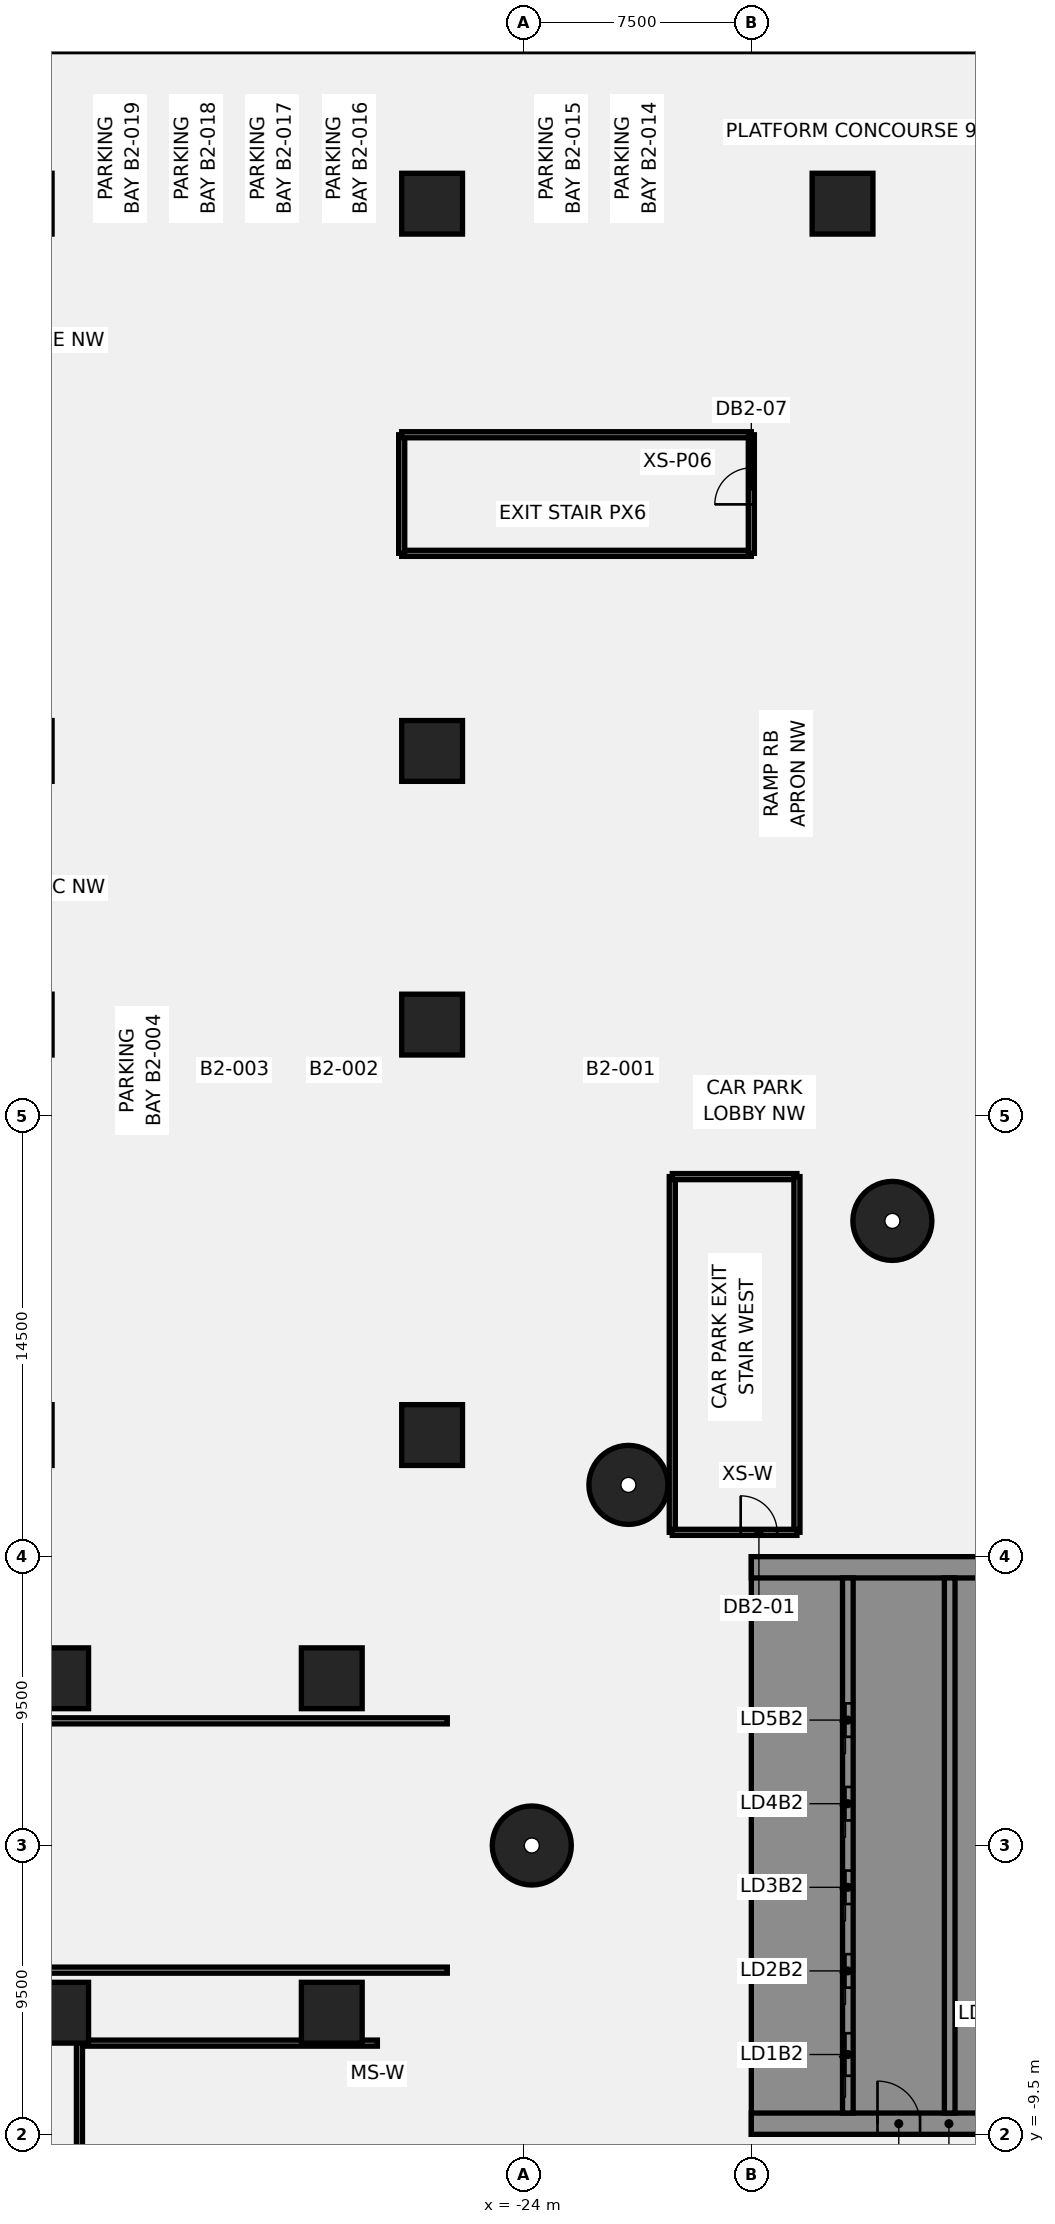
"""IFC4 building model, lengths in metres.
Left out: names, types, materials, properties, quantities, classifications, styles, units other than length and angle.
Written with IfcOpenShell. Run it as: python <this file> out.ifc"""

import sys

from ifc_helpers import new_model, si_unit, direction, frame, frame_2d, origin, origin_2d, place, context, subcontext, project, spatial, polyline, rectangle, circle, outline, extrude, element, fill, save


model = new_model("IFC4")
c1 = context("Model", 3, precision=1e-05, world=origin(), true_north=direction((0.0, 1.0)))
c2 = subcontext(c1, "Body", "Model", "MODEL_VIEW")
j1 = project(units=[si_unit("LENGTHUNIT", "METRE"), si_unit("PLANEANGLEUNIT", "RADIAN")], contexts=[c1])
p1 = place(None, origin())
s1 = spatial("IfcSite", under=j1, at=p1, CompositionType="ELEMENT")
p2 = place(p1, origin())
s2 = spatial("IfcBuilding", under=s1, at=p2, CompositionType="ELEMENT")
p3 = place(p2, frame((0.0, 0.0, -14.0)))
s3 = spatial("IfcBuildingStorey", under=s2, at=p3, CompositionType="ELEMENT", Elevation=-14.0)
for number, where, z_axis, x_axis in (
    (1, (-11.86, 20.543, -0.45), (0.0, 0.0, 1.0), (1.0, 0.0, 0.0)),
    (2, (-20.543, 11.86, -0.45), (0.0, 0.0, 1.0), (1.0, 0.0, 0.0)),
    (3, (-23.721, 0.0, -0.45), (0.0, 0.0, 1.0), (1.0, 0.0, 0.0)),
):
    element("IfcColumn", number, at=place(p3, frame(where, z_axis=z_axis, x_axis=x_axis)), inside=s3, PredefinedType="COLUMN", context=c2, shape_type="SweptSolid", body=[
        extrude(circle(Radius=1.3, at=origin_2d()), origin(), (0.0, 0.0, 1.0), 7.0),
    ])
for number, where, z_axis, x_axis in (
    (4, (-39.3, -5.5, -0.45), (0.0, 0.0, 1.0), (1.0, 0.0, 0.0)),
    (5, (-39.3, 5.5, -0.45), (0.0, 0.0, 1.0), (1.0, 0.0, 0.0)),
    (6, (-30.3, -5.5, -0.45), (0.0, 0.0, 1.0), (1.0, 0.0, 0.0)),
    (7, (-30.3, 5.5, -0.45), (0.0, 0.0, 1.0), (1.0, 0.0, 0.0)),
    (8, (-27.0, 13.5, -0.45), (0.0, 0.0, 1.0), (1.0, 0.0, 0.0)),
    (9, (-27.0, 27.0, -0.45), (0.0, 0.0, 1.0), (1.0, 0.0, 0.0)),
    (10, (-27.0, 36.0, -0.45), (0.0, 0.0, 1.0), (1.0, 0.0, 0.0)),
    (11, (-27.0, 54.0, -0.45), (0.0, 0.0, 1.0), (1.0, 0.0, 0.0)),
    (12, (-13.5, 54.0, -0.45), (0.0, 0.0, 1.0), (1.0, 0.0, 0.0)),
):
    element("IfcColumn", number, at=place(p3, frame(where, z_axis=z_axis, x_axis=x_axis)), inside=s3, PredefinedType="COLUMN", context=c2, shape_type="SweptSolid", body=[
        extrude(rectangle(XDim=2.0, YDim=2.0, at=origin_2d()), origin(), (0.0, 0.0, 1.0), 7.0),
    ])
p4 = place(p3, frame((-19.1, 10.3, 0.0), z_axis=(0.0, 0.0, 1.0), x_axis=(0.0, 1.0, 0.0)))
e13 = element("IfcWall", 13, at=p4, inside=s3, PredefinedType="PARTITIONING", context=c2, shape_type="SweptSolid", body=[
    extrude(rectangle(XDim=11.7, YDim=0.2, at=frame_2d((5.85, 0.0))), origin(), (0.0, 0.0, 1.0), 6.55),
])
p5 = place(p3, frame((-19.1, 22.0, 0.0), z_axis=(0.0, 0.0, 1.0), x_axis=(1.0, 0.0, 0.0)))
e14 = element("IfcWall", 14, at=p5, inside=s3, PredefinedType="PARTITIONING", context=c2, shape_type="SweptSolid", body=[
    extrude(rectangle(XDim=4.1, YDim=0.2, at=frame_2d((2.05, 0.0))), origin(), (0.0, 0.0, 1.0), 6.55),
])
p6 = place(p3, frame((-15.0, 10.3, 0.0), z_axis=(0.0, 0.0, 1.0), x_axis=(0.0, 1.0, 0.0)))
e15 = element("IfcWall", 15, at=p6, inside=s3, PredefinedType="PARTITIONING", context=c2, shape_type="SweptSolid", body=[
    extrude(rectangle(XDim=11.7, YDim=0.2, at=frame_2d((5.85, 0.0))), origin(), (0.0, 0.0, 1.0), 6.55),
])
p7 = place(p3, frame((-19.1, 10.3, 0.0), z_axis=(0.0, 0.0, 1.0), x_axis=(1.0, 0.0, 0.0)))
e16 = element("IfcWall", 16, at=p7, inside=s3, PredefinedType="PARTITIONING", context=c2, shape_type="SweptSolid", body=[
    extrude(rectangle(XDim=4.1, YDim=0.2, at=frame_2d((2.05, 0.0))), origin(), (0.0, 0.0, 1.0), 6.55),
])
p8 = place(p7, frame((2.25, 0.0, 0.0)))
e17 = element("IfcOpeningElement", 17, at=p8, cuts=e16, PredefinedType="OPENING", context=c2, shape_type="SweptSolid", body=[
    extrude(rectangle(XDim=1.2, YDim=2.1, at=frame_2d((0.6, 1.05))), frame((0.0, 0.11, 0.0), z_axis=(0.0, -1.0, 0.0), x_axis=(1.0, 0.0, 0.0)), (0.0, 0.0, 1.0), 0.22),
])
p9 = place(p3, frame((-28.0, 42.5, 0.0), z_axis=(0.0, 0.0, 1.0), x_axis=(1.0, 0.0, 0.0)))
e18 = element("IfcWall", 18, at=p9, inside=s3, PredefinedType="PARTITIONING", context=c2, shape_type="SweptSolid", body=[
    extrude(rectangle(XDim=11.5, YDim=0.2, at=frame_2d((5.75, 0.0))), origin(), (0.0, 0.0, 1.0), 6.55),
])
p10 = place(p3, frame((-28.0, 42.5, 0.0), z_axis=(0.0, 0.0, 1.0), x_axis=(0.0, 1.0, 0.0)))
e19 = element("IfcWall", 19, at=p10, inside=s3, PredefinedType="PARTITIONING", context=c2, shape_type="SweptSolid", body=[
    extrude(rectangle(XDim=3.9, YDim=0.2, at=frame_2d((1.95, 0.0))), origin(), (0.0, 0.0, 1.0), 6.55),
])
p11 = place(p3, frame((-28.0, 46.4, 0.0), z_axis=(0.0, 0.0, 1.0), x_axis=(1.0, 0.0, 0.0)))
e20 = element("IfcWall", 20, at=p11, inside=s3, PredefinedType="PARTITIONING", context=c2, shape_type="SweptSolid", body=[
    extrude(rectangle(XDim=11.5, YDim=0.2, at=frame_2d((5.75, 0.0))), origin(), (0.0, 0.0, 1.0), 6.55),
])
p12 = place(p3, frame((-16.5, 42.5, 0.0), z_axis=(0.0, 0.0, 1.0), x_axis=(0.0, 1.0, 0.0)))
e21 = element("IfcWall", 21, at=p12, inside=s3, PredefinedType="PARTITIONING", context=c2, shape_type="SweptSolid", body=[
    extrude(rectangle(XDim=3.9, YDim=0.2, at=frame_2d((1.95, 0.0))), origin(), (0.0, 0.0, 1.0), 6.55),
])
p13 = place(p12, frame((1.61, 0.0, 0.0)))
e22 = element("IfcOpeningElement", 22, at=p13, cuts=e21, PredefinedType="OPENING", context=c2, shape_type="SweptSolid", body=[
    extrude(rectangle(XDim=1.2, YDim=2.1, at=frame_2d((0.6, 1.05))), frame((0.0, 0.11, 0.0), z_axis=(0.0, -1.0, 0.0), x_axis=(1.0, 0.0, 0.0)), (0.0, 0.0, 1.0), 0.22),
])
for number, where, z_axis, x_axis in (
    (23, (-69.4, 4.1, 0.0), (0.0, 0.0, 1.0), (1.0, 0.0, 0.0)),
    (24, (-69.4, -4.1, 0.0), (0.0, 0.0, 1.0), (1.0, 0.0, 0.0)),
):
    element("IfcWall", number, at=place(p3, frame(where, z_axis=z_axis, x_axis=x_axis)), inside=s3, PredefinedType="PARTITIONING", context=c2, shape_type="SweptSolid", body=[
        extrude(rectangle(XDim=42.9, YDim=0.2, at=frame_2d((21.45, 0.0))), origin(), (0.0, 0.0, 1.0), 6.55),
    ])
p14 = place(p3, frame((-28.8, -6.5, 0.0), z_axis=(0.0, 0.0, 1.0), x_axis=(-1.0, 0.0, 0.0)))
e25 = element("IfcWall", 25, at=p14, inside=s3, PredefinedType="SOLIDWALL", context=c2, shape_type="SweptSolid", body=[
    extrude(rectangle(XDim=9.7, YDim=0.2, at=frame_2d((4.85, 0.0))), origin(), (0.0, 0.0, 1.0), 6.55),
])
p15 = place(p3, frame((-38.6, -6.4, 0.0), z_axis=(0.0, 0.0, 1.0), x_axis=(0.0, -1.0, 0.0)))
e26 = element("IfcWall", 26, at=p15, inside=s3, PredefinedType="SOLIDWALL", context=c2, shape_type="SweptSolid", body=[
    extrude(rectangle(XDim=4.3, YDim=0.2, at=frame_2d((2.15, 0.0))), origin(), (0.0, 0.0, 1.0), 6.55),
])
p16 = place(p3, frame((-16.5, -9.15, 0.0), z_axis=(0.0, 0.0, 1.0), x_axis=(1.0, 0.0, 0.0)))
e27 = element("IfcWall", 27, at=p16, inside=s3, PredefinedType="SHEAR", context=c2, shape_type="SweptSolid", body=[
    extrude(rectangle(XDim=13.0, YDim=0.7, at=frame_2d((6.5, 0.0))), origin(), (0.0, 0.0, 1.0), 6.55),
])
p17 = place(p16, frame((4.15, 0.0, 0.0)))
e28 = element("IfcOpeningElement", 28, at=p17, cuts=e27, PredefinedType="OPENING", context=c2, shape_type="SweptSolid", body=[
    extrude(rectangle(XDim=1.4, YDim=2.1, at=frame_2d((0.7, 1.05))), frame((0.0, 0.36, 0.0), z_axis=(0.0, -1.0, 0.0), x_axis=(1.0, 0.0, 0.0)), (0.0, 0.0, 1.0), 0.72),
])
p18 = place(p16, frame((10.125, 0.0, 0.0)))
e29 = element("IfcOpeningElement", 29, at=p18, cuts=e27, PredefinedType="OPENING", context=c2, shape_type="SweptSolid", body=[
    extrude(rectangle(XDim=1.4, YDim=2.1, at=frame_2d((0.7, 1.05))), frame((0.0, 0.36, 0.0), z_axis=(0.0, -1.0, 0.0), x_axis=(1.0, 0.0, 0.0)), (0.0, 0.0, 1.0), 0.72),
])
p19 = place(p3, origin())
e30 = element("IfcWall", 30, at=p19, inside=s3, PredefinedType="SHEAR", context=c2, shape_type="SweptSolid", body=[
    extrude(outline(polyline([(-13.5, -8.8), (-13.5, -8.125), (-15.8, -8.125), (-15.8, -5.625), (-13.5, -5.625), (-13.5, -5.375), (-15.8, -5.375), (-15.8, -2.875), (-13.5, -2.875), (-13.5, -2.625), (-15.8, -2.625), (-15.8, -0.125), (-13.5, -0.125), (-13.5, 0.125), (-15.8, 0.125), (-15.8, 2.625), (-13.5, 2.625), (-13.5, 2.875), (-15.8, 2.875), (-15.8, 5.375), (-13.5, 5.375), (-13.5, 5.625), (-15.8, 5.625), (-15.8, 8.125), (-13.5, 8.125), (-13.5, 8.8), (-15.8, 8.8), (-16.5, 8.8), (-16.5, -8.8), (-15.8, -8.8), (-13.5, -8.8)])), origin(), (0.0, 0.0, 1.0), 6.55),
])
p20 = place(p3, frame((-16.5, 9.15, 0.0), z_axis=(0.0, 0.0, 1.0), x_axis=(1.0, 0.0, 0.0)))
e31 = element("IfcWall", 31, at=p20, inside=s3, PredefinedType="SHEAR", context=c2, shape_type="SweptSolid", body=[
    extrude(rectangle(XDim=13.0, YDim=0.7, at=frame_2d((6.5, 0.0))), origin(), (0.0, 0.0, 1.0), 6.55),
])
p21 = place(p3, origin())
e32 = element("IfcWall", 32, at=p21, inside=s3, PredefinedType="SHEAR", context=c2, shape_type="SweptSolid", body=[
    extrude(outline(polyline([(-9.8, -5.375), (-9.8, -5.625), (-7.5, -5.625), (-7.15, -5.625), (-7.15, 8.8), (-7.5, 8.8), (-9.8, 8.8), (-9.8, 8.125), (-7.5, 8.125), (-7.5, 5.625), (-9.8, 5.625), (-9.8, 5.375), (-7.5, 5.375), (-7.5, 2.875), (-9.8, 2.875), (-9.8, 2.625), (-7.5, 2.625), (-7.5, 0.125), (-9.8, 0.125), (-9.8, -0.125), (-7.5, -0.125), (-7.5, -2.625), (-9.8, -2.625), (-9.8, -2.875), (-7.5, -2.875), (-7.5, -5.375), (-9.8, -5.375)])), origin(), (0.0, 0.0, 1.0), 6.55),
])
p22 = place(p3, origin())
e33 = element("IfcWall", 33, at=p22, inside=s3, PredefinedType="SHEAR", context=c2, shape_type="SweptSolid", body=[
    extrude(outline(polyline([(-7.5, -8.125), (-9.55, -8.125), (-9.55, -5.625), (-9.8, -5.625), (-9.8, -8.125), (-9.8, -8.8), (-7.5, -8.8), (-7.5, -8.125)])), origin(), (0.0, 0.0, 1.0), 6.55),
])
p23 = place(p3, frame((-13.325, -8.8, 0.0), z_axis=(0.0, 0.0, 1.0), x_axis=(0.0, 1.0, 0.0)))
e34 = element("IfcWall", 34, at=p23, inside=s3, PredefinedType="SHEAR", context=c2, shape_type="SweptSolid", body=[
    extrude(rectangle(XDim=17.6, YDim=0.35, at=frame_2d((8.8, 0.0))), origin(), (0.0, 0.0, 1.0), 6.55),
])
p24 = place(p23, frame((1.225, 0.0, 0.0)))
e35 = element("IfcOpeningElement", 35, at=p24, cuts=e34, PredefinedType="OPENING", context=c2, shape_type="SweptSolid", body=[
    extrude(rectangle(XDim=1.4, YDim=2.1, at=frame_2d((0.7, 1.05))), frame((0.0, 0.185, 0.0), z_axis=(0.0, -1.0, 0.0), x_axis=(1.0, 0.0, 0.0)), (0.0, 0.0, 1.0), 0.37),
])
p25 = place(p23, frame((4.125, 0.0, 0.0)))
e36 = element("IfcOpeningElement", 36, at=p25, cuts=e34, PredefinedType="OPENING", context=c2, shape_type="SweptSolid", body=[
    extrude(rectangle(XDim=1.1, YDim=2.1, at=frame_2d((0.55, 1.05))), frame((0.0, 0.185, 0.0), z_axis=(0.0, -1.0, 0.0), x_axis=(1.0, 0.0, 0.0)), (0.0, 0.0, 1.0), 0.37),
])
p26 = place(p23, frame((6.875, 0.0, 0.0)))
e37 = element("IfcOpeningElement", 37, at=p26, cuts=e34, PredefinedType="OPENING", context=c2, shape_type="SweptSolid", body=[
    extrude(rectangle(XDim=1.1, YDim=2.1, at=frame_2d((0.55, 1.05))), frame((0.0, 0.185, 0.0), z_axis=(0.0, -1.0, 0.0), x_axis=(1.0, 0.0, 0.0)), (0.0, 0.0, 1.0), 0.37),
])
p27 = place(p23, frame((9.625, 0.0, 0.0)))
e38 = element("IfcOpeningElement", 38, at=p27, cuts=e34, PredefinedType="OPENING", context=c2, shape_type="SweptSolid", body=[
    extrude(rectangle(XDim=1.1, YDim=2.1, at=frame_2d((0.55, 1.05))), frame((0.0, 0.185, 0.0), z_axis=(0.0, -1.0, 0.0), x_axis=(1.0, 0.0, 0.0)), (0.0, 0.0, 1.0), 0.37),
])
p28 = place(p23, frame((12.375, 0.0, 0.0)))
e39 = element("IfcOpeningElement", 39, at=p28, cuts=e34, PredefinedType="OPENING", context=c2, shape_type="SweptSolid", body=[
    extrude(rectangle(XDim=1.1, YDim=2.1, at=frame_2d((0.55, 1.05))), frame((0.0, 0.185, 0.0), z_axis=(0.0, -1.0, 0.0), x_axis=(1.0, 0.0, 0.0)), (0.0, 0.0, 1.0), 0.37),
])
p29 = place(p3, frame((-9.975, -8.8, 0.0), z_axis=(0.0, 0.0, 1.0), x_axis=(0.0, 1.0, 0.0)))
e40 = element("IfcWall", 40, at=p29, inside=s3, PredefinedType="SHEAR", context=c2, shape_type="SweptSolid", body=[
    extrude(rectangle(XDim=17.6, YDim=0.35, at=frame_2d((8.8, 0.0))), origin(), (0.0, 0.0, 1.0), 6.55),
])
p30 = place(p8, origin())
e41 = element("IfcDoor", 41, at=p30, inside=s3, OperationType="SINGLE_SWING_LEFT", PredefinedType="DOOR", context=c2, shape_type="SweptSolid", body=[
    extrude(rectangle(XDim=1.2, YDim=2.1, at=frame_2d((0.6, 1.05))), frame((0.0, 0.025, 0.0), z_axis=(0.0, -1.0, 0.0), x_axis=(1.0, 0.0, 0.0)), (0.0, 0.0, 1.0), 0.05),
])
fill(e17, e41)
p31 = place(p13, origin())
e42 = element("IfcDoor", 42, at=p31, inside=s3, OperationType="SINGLE_SWING_LEFT", PredefinedType="DOOR", context=c2, shape_type="SweptSolid", body=[
    extrude(rectangle(XDim=1.2, YDim=2.1, at=frame_2d((0.6, 1.05))), frame((0.0, 0.025, 0.0), z_axis=(0.0, -1.0, 0.0), x_axis=(1.0, 0.0, 0.0)), (0.0, 0.0, 1.0), 0.05),
])
fill(e22, e42)
p32 = place(p17, origin())
e43 = element("IfcDoor", 43, at=p32, inside=s3, OperationType="SINGLE_SWING_LEFT", PredefinedType="DOOR", context=c2, shape_type="SweptSolid", body=[
    extrude(rectangle(XDim=1.4, YDim=2.1, at=frame_2d((0.7, 1.05))), frame((0.0, 0.025, 0.0), z_axis=(0.0, -1.0, 0.0), x_axis=(1.0, 0.0, 0.0)), (0.0, 0.0, 1.0), 0.05),
])
fill(e28, e43)
p33 = place(p24, origin())
e44 = element("IfcDoor", 44, at=p33, inside=s3, OperationType="SLIDING_TO_LEFT", PredefinedType="DOOR", context=c2, shape_type="SweptSolid", body=[
    extrude(rectangle(XDim=1.4, YDim=2.1, at=frame_2d((0.7, 1.05))), frame((0.0, 0.025, 0.0), z_axis=(0.0, -1.0, 0.0), x_axis=(1.0, 0.0, 0.0)), (0.0, 0.0, 1.0), 0.05),
])
fill(e35, e44)
p34 = place(p25, origin())
e45 = element("IfcDoor", 45, at=p34, inside=s3, OperationType="SLIDING_TO_LEFT", PredefinedType="DOOR", context=c2, shape_type="SweptSolid", body=[
    extrude(rectangle(XDim=1.1, YDim=2.1, at=frame_2d((0.55, 1.05))), frame((0.0, 0.025, 0.0), z_axis=(0.0, -1.0, 0.0), x_axis=(1.0, 0.0, 0.0)), (0.0, 0.0, 1.0), 0.05),
])
fill(e36, e45)
p35 = place(p26, origin())
e46 = element("IfcDoor", 46, at=p35, inside=s3, OperationType="SLIDING_TO_LEFT", PredefinedType="DOOR", context=c2, shape_type="SweptSolid", body=[
    extrude(rectangle(XDim=1.1, YDim=2.1, at=frame_2d((0.55, 1.05))), frame((0.0, 0.025, 0.0), z_axis=(0.0, -1.0, 0.0), x_axis=(1.0, 0.0, 0.0)), (0.0, 0.0, 1.0), 0.05),
])
fill(e37, e46)
p36 = place(p27, origin())
e47 = element("IfcDoor", 47, at=p36, inside=s3, OperationType="SLIDING_TO_LEFT", PredefinedType="DOOR", context=c2, shape_type="SweptSolid", body=[
    extrude(rectangle(XDim=1.1, YDim=2.1, at=frame_2d((0.55, 1.05))), frame((0.0, 0.025, 0.0), z_axis=(0.0, -1.0, 0.0), x_axis=(1.0, 0.0, 0.0)), (0.0, 0.0, 1.0), 0.05),
])
fill(e38, e47)
p37 = place(p28, origin())
e48 = element("IfcDoor", 48, at=p37, inside=s3, OperationType="SLIDING_TO_LEFT", PredefinedType="DOOR", context=c2, shape_type="SweptSolid", body=[
    extrude(rectangle(XDim=1.1, YDim=2.1, at=frame_2d((0.55, 1.05))), frame((0.0, 0.025, 0.0), z_axis=(0.0, -1.0, 0.0), x_axis=(1.0, 0.0, 0.0)), (0.0, 0.0, 1.0), 0.05),
])
fill(e39, e48)
save(model, sys.argv[1])
